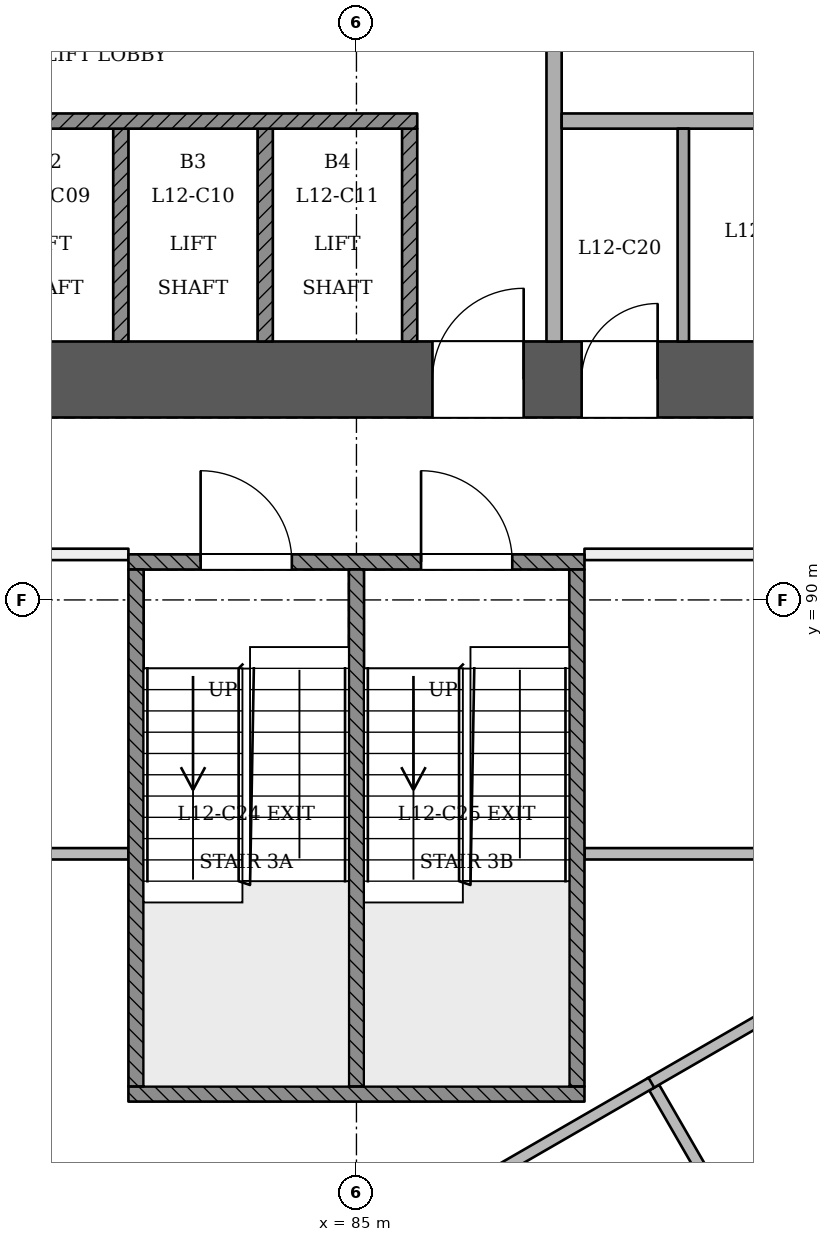
"""IFC4 building model, lengths in metres.
Left out: names, types, materials, properties, quantities, classifications, styles, units other than length and angle.
Written with IfcOpenShell. Run it as: python <this file> out.ifc"""

import sys

from ifc_helpers import new_model, si_unit, direction, frame, frame_2d, origin, place, context, subcontext, project, spatial, rectangle, extrude, element, fill, save


model = new_model("IFC4")
c1 = context("Model", 3, precision=1e-05, world=origin(), true_north=direction((0.0, 1.0)))
c2 = subcontext(c1, "Body", "Model", "MODEL_VIEW")
j1 = project(units=[si_unit("LENGTHUNIT", "METRE"), si_unit("PLANEANGLEUNIT", "RADIAN")], contexts=[c1])
p1 = place(None, origin())
s1 = spatial("IfcSite", under=j1, at=p1, CompositionType="ELEMENT")
p2 = place(p1, origin())
s2 = spatial("IfcBuilding", under=s1, at=p2, CompositionType="ELEMENT")
p3 = place(p2, frame((0.0, 0.0, 52.2)))
s3 = spatial("IfcBuildingStorey", under=s2, at=p3, CompositionType="ELEMENT", Elevation=52.2)
p4 = place(p3, frame((72.5, 92.9, 0.0), z_axis=(0.0, 0.0, 1.0), x_axis=(1.0, 0.0, 0.0)))
e1 = element("IfcWall", 1, at=p4, inside=s3, PredefinedType="SHEAR", context=c2, shape_type="SweptSolid", body=[
    extrude(rectangle(XDim=25.5, YDim=1.0, at=frame_2d((12.75, 0.0))), origin(), (0.0, 0.0, 1.0), 3.6),
])
p5 = place(p4, frame((1.3, 0.0, 0.0)))
e2 = element("IfcOpeningElement", 2, at=p5, cuts=e1, PredefinedType="OPENING", context=c2, shape_type="SweptSolid", body=[
    extrude(rectangle(XDim=1.2, YDim=2.1, at=frame_2d((0.6, 1.05))), frame((0.0, 0.51, 0.0), z_axis=(0.0, -1.0, 0.0), x_axis=(1.0, 0.0, 0.0)), (0.0, 0.0, 1.0), 1.021),
])
p6 = place(p4, frame((3.5, 0.0, 0.0)))
e3 = element("IfcOpeningElement", 3, at=p6, cuts=e1, PredefinedType="OPENING", context=c2, shape_type="SweptSolid", body=[
    extrude(rectangle(XDim=1.2, YDim=2.1, at=frame_2d((0.6, 1.05))), frame((0.0, 0.51, 0.0), z_axis=(0.0, -1.0, 0.0), x_axis=(1.0, 0.0, 0.0)), (0.0, 0.0, 1.0), 1.021),
])
p7 = place(p4, frame((13.5, 0.0, 0.0)))
e4 = element("IfcOpeningElement", 4, at=p7, cuts=e1, PredefinedType="OPENING", context=c2, shape_type="SweptSolid", body=[
    extrude(rectangle(XDim=1.2, YDim=2.1, at=frame_2d((0.6, 1.05))), frame((0.0, 0.51, 0.0), z_axis=(0.0, -1.0, 0.0), x_axis=(1.0, 0.0, 0.0)), (0.0, 0.0, 1.0), 1.021),
])
p8 = place(p4, frame((15.462, 0.0, 0.0)))
e5 = element("IfcOpeningElement", 5, at=p8, cuts=e1, PredefinedType="OPENING", context=c2, shape_type="SweptSolid", body=[
    extrude(rectangle(XDim=1.0, YDim=2.1, at=frame_2d((0.5, 1.05))), frame((0.0, 0.51, 0.0), z_axis=(0.0, -1.0, 0.0), x_axis=(1.0, 0.0, 0.0)), (0.0, 0.0, 1.0), 1.021),
])
p9 = place(p4, frame((18.3, 0.0, 0.0)))
e6 = element("IfcOpeningElement", 6, at=p9, cuts=e1, PredefinedType="OPENING", context=c2, shape_type="SweptSolid", body=[
    extrude(rectangle(XDim=1.0, YDim=2.1, at=frame_2d((0.5, 1.05))), frame((0.0, 0.51, 0.0), z_axis=(0.0, -1.0, 0.0), x_axis=(1.0, 0.0, 0.0)), (0.0, 0.0, 1.0), 1.021),
])
p10 = place(p4, frame((21.2, 0.0, 0.0)))
e7 = element("IfcOpeningElement", 7, at=p10, cuts=e1, PredefinedType="OPENING", context=c2, shape_type="SweptSolid", body=[
    extrude(rectangle(XDim=1.0, YDim=2.1, at=frame_2d((0.5, 1.05))), frame((0.0, 0.51, 0.0), z_axis=(0.0, -1.0, 0.0), x_axis=(1.0, 0.0, 0.0)), (0.0, 0.0, 1.0), 1.021),
])
p11 = place(p4, frame((23.087, 0.0, 0.0)))
e8 = element("IfcOpeningElement", 8, at=p11, cuts=e1, PredefinedType="OPENING", context=c2, shape_type="SweptSolid", body=[
    extrude(rectangle(XDim=1.0, YDim=2.1, at=frame_2d((0.5, 1.05))), frame((0.0, 0.51, 0.0), z_axis=(0.0, -1.0, 0.0), x_axis=(1.0, 0.0, 0.0)), (0.0, 0.0, 1.0), 1.021),
])
p12 = place(p3, frame((64.002, 93.308, 0.0), z_axis=(0.0, 0.0, 1.0), x_axis=(0.49999948646, -0.866025700277, 0.0)))
e9 = element("IfcWall", 9, at=p12, inside=s3, PredefinedType="PARTITIONING", context=c2, shape_type="SweptSolid", body=[
    extrude(rectangle(XDim=38.6, YDim=0.15, at=frame_2d((19.3, 0.0))), origin(), (0.0, 0.0, 1.0), 2.7),
])
p13 = place(p12, frame((0.605, 0.0, 0.0)))
e10 = element("IfcOpeningElement", 10, at=p13, cuts=e9, PredefinedType="OPENING", context=c2, shape_type="SweptSolid", body=[
    extrude(rectangle(XDim=1.0, YDim=2.1, at=frame_2d((0.5, 1.05))), frame((0.0, 0.085, 0.0), z_axis=(0.0, -1.0, 0.0), x_axis=(1.0, 0.0, 0.0)), (0.0, 0.0, 1.0), 0.171),
])
p14 = place(p12, frame((7.28, 0.0, 0.0)))
e11 = element("IfcOpeningElement", 11, at=p14, cuts=e9, PredefinedType="OPENING", context=c2, shape_type="SweptSolid", body=[
    extrude(rectangle(XDim=1.0, YDim=2.1, at=frame_2d((0.5, 1.05))), frame((0.0, 0.085, 0.0), z_axis=(0.0, -1.0, 0.0), x_axis=(1.0, 0.0, 0.0)), (0.0, 0.0, 1.0), 0.171),
])
p15 = place(p12, frame((9.72, 0.0, 0.0)))
e12 = element("IfcOpeningElement", 12, at=p15, cuts=e9, PredefinedType="OPENING", context=c2, shape_type="SweptSolid", body=[
    extrude(rectangle(XDim=1.0, YDim=2.1, at=frame_2d((0.5, 1.05))), frame((0.0, 0.085, 0.0), z_axis=(0.0, -1.0, 0.0), x_axis=(1.0, 0.0, 0.0)), (0.0, 0.0, 1.0), 0.171),
])
p16 = place(p12, frame((16.395, 0.0, 0.0)))
e13 = element("IfcOpeningElement", 13, at=p16, cuts=e9, PredefinedType="OPENING", context=c2, shape_type="SweptSolid", body=[
    extrude(rectangle(XDim=1.0, YDim=2.1, at=frame_2d((0.5, 1.05))), frame((0.0, 0.085, 0.0), z_axis=(0.0, -1.0, 0.0), x_axis=(1.0, 0.0, 0.0)), (0.0, 0.0, 1.0), 0.171),
])
p17 = place(p12, frame((18.72, 0.0, 0.0)))
e14 = element("IfcOpeningElement", 14, at=p17, cuts=e9, PredefinedType="OPENING", context=c2, shape_type="SweptSolid", body=[
    extrude(rectangle(XDim=1.0, YDim=2.1, at=frame_2d((0.5, 1.05))), frame((0.0, 0.085, 0.0), z_axis=(0.0, -1.0, 0.0), x_axis=(1.0, 0.0, 0.0)), (0.0, 0.0, 1.0), 0.171),
])
p18 = place(p12, frame((25.395, 0.0, 0.0)))
e15 = element("IfcOpeningElement", 15, at=p18, cuts=e9, PredefinedType="OPENING", context=c2, shape_type="SweptSolid", body=[
    extrude(rectangle(XDim=1.0, YDim=2.1, at=frame_2d((0.5, 1.05))), frame((0.0, 0.085, 0.0), z_axis=(0.0, -1.0, 0.0), x_axis=(1.0, 0.0, 0.0)), (0.0, 0.0, 1.0), 0.171),
])
p19 = place(p12, frame((27.605, 0.0, 0.0)))
e16 = element("IfcOpeningElement", 16, at=p19, cuts=e9, PredefinedType="OPENING", context=c2, shape_type="SweptSolid", body=[
    extrude(rectangle(XDim=1.0, YDim=2.1, at=frame_2d((0.5, 1.05))), frame((0.0, 0.085, 0.0), z_axis=(0.0, -1.0, 0.0), x_axis=(1.0, 0.0, 0.0)), (0.0, 0.0, 1.0), 0.171),
])
p20 = place(p12, frame((34.28, 0.0, 0.0)))
e17 = element("IfcOpeningElement", 17, at=p20, cuts=e9, PredefinedType="OPENING", context=c2, shape_type="SweptSolid", body=[
    extrude(rectangle(XDim=1.0, YDim=2.1, at=frame_2d((0.5, 1.05))), frame((0.0, 0.085, 0.0), z_axis=(0.0, -1.0, 0.0), x_axis=(1.0, 0.0, 0.0)), (0.0, 0.0, 1.0), 0.171),
])
p21 = place(p12, frame((37.324, 0.0, 0.0)))
e18 = element("IfcOpeningElement", 18, at=p21, cuts=e9, PredefinedType="OPENING", context=c2, shape_type="SweptSolid", body=[
    extrude(rectangle(XDim=1.0, YDim=2.1, at=frame_2d((0.5, 1.05))), frame((0.0, 0.085, 0.0), z_axis=(0.0, -1.0, 0.0), x_axis=(1.0, 0.0, 0.0)), (0.0, 0.0, 1.0), 0.171),
])
p22 = place(p3, frame((86.05, 58.757, 0.0), z_axis=(0.0, 0.0, 1.0), x_axis=(0.499999296855, 0.866025809745, 0.0)))
e19 = element("IfcWall", 19, at=p22, inside=s3, PredefinedType="PARTITIONING", context=c2, shape_type="SweptSolid", body=[
    extrude(rectangle(XDim=43.792, YDim=0.15, at=frame_2d((21.896, 0.0))), origin(), (0.0, 0.0, 1.0), 2.7),
])
p23 = place(p22, frame((3.598, 0.0, 0.0)))
e20 = element("IfcOpeningElement", 20, at=p23, cuts=e19, PredefinedType="OPENING", context=c2, shape_type="SweptSolid", body=[
    extrude(rectangle(XDim=1.2, YDim=2.1, at=frame_2d((0.6, 1.05))), frame((0.0, 0.085, 0.0), z_axis=(0.0, -1.0, 0.0), x_axis=(1.0, 0.0, 0.0)), (0.0, 0.0, 1.0), 0.171),
])
p24 = place(p22, frame((11.176, 0.0, 0.0)))
e21 = element("IfcOpeningElement", 21, at=p24, cuts=e19, PredefinedType="OPENING", context=c2, shape_type="SweptSolid", body=[
    extrude(rectangle(XDim=1.0, YDim=2.1, at=frame_2d((0.5, 1.05))), frame((0.0, 0.085, 0.0), z_axis=(0.0, -1.0, 0.0), x_axis=(1.0, 0.0, 0.0)), (0.0, 0.0, 1.0), 0.171),
])
p25 = place(p22, frame((13.616, 0.0, 0.0)))
e22 = element("IfcOpeningElement", 22, at=p25, cuts=e19, PredefinedType="OPENING", context=c2, shape_type="SweptSolid", body=[
    extrude(rectangle(XDim=1.0, YDim=2.1, at=frame_2d((0.5, 1.05))), frame((0.0, 0.085, 0.0), z_axis=(0.0, -1.0, 0.0), x_axis=(1.0, 0.0, 0.0)), (0.0, 0.0, 1.0), 0.171),
])
p26 = place(p22, frame((20.176, 0.0, 0.0)))
e23 = element("IfcOpeningElement", 23, at=p26, cuts=e19, PredefinedType="OPENING", context=c2, shape_type="SweptSolid", body=[
    extrude(rectangle(XDim=1.0, YDim=2.1, at=frame_2d((0.5, 1.05))), frame((0.0, 0.085, 0.0), z_axis=(0.0, -1.0, 0.0), x_axis=(1.0, 0.0, 0.0)), (0.0, 0.0, 1.0), 0.171),
])
p27 = place(p22, frame((22.616, 0.0, 0.0)))
e24 = element("IfcOpeningElement", 24, at=p27, cuts=e19, PredefinedType="OPENING", context=c2, shape_type="SweptSolid", body=[
    extrude(rectangle(XDim=1.0, YDim=2.1, at=frame_2d((0.5, 1.05))), frame((0.0, 0.085, 0.0), z_axis=(0.0, -1.0, 0.0), x_axis=(1.0, 0.0, 0.0)), (0.0, 0.0, 1.0), 0.171),
])
p28 = place(p22, frame((29.176, 0.0, 0.0)))
e25 = element("IfcOpeningElement", 25, at=p28, cuts=e19, PredefinedType="OPENING", context=c2, shape_type="SweptSolid", body=[
    extrude(rectangle(XDim=1.0, YDim=2.1, at=frame_2d((0.5, 1.05))), frame((0.0, 0.085, 0.0), z_axis=(0.0, -1.0, 0.0), x_axis=(1.0, 0.0, 0.0)), (0.0, 0.0, 1.0), 0.171),
])
p29 = place(p22, frame((31.616, 0.0, 0.0)))
e26 = element("IfcOpeningElement", 26, at=p29, cuts=e19, PredefinedType="OPENING", context=c2, shape_type="SweptSolid", body=[
    extrude(rectangle(XDim=1.0, YDim=2.1, at=frame_2d((0.5, 1.05))), frame((0.0, 0.085, 0.0), z_axis=(0.0, -1.0, 0.0), x_axis=(1.0, 0.0, 0.0)), (0.0, 0.0, 1.0), 0.171),
])
p30 = place(p22, frame((38.176, 0.0, 0.0)))
e27 = element("IfcOpeningElement", 27, at=p30, cuts=e19, PredefinedType="OPENING", context=c2, shape_type="SweptSolid", body=[
    extrude(rectangle(XDim=1.0, YDim=2.1, at=frame_2d((0.5, 1.05))), frame((0.0, 0.085, 0.0), z_axis=(0.0, -1.0, 0.0), x_axis=(1.0, 0.0, 0.0)), (0.0, 0.0, 1.0), 0.171),
])
p31 = place(p22, frame((41.344, 0.0, 0.0)))
e28 = element("IfcOpeningElement", 28, at=p31, cuts=e19, PredefinedType="OPENING", context=c2, shape_type="SweptSolid", body=[
    extrude(rectangle(XDim=1.0, YDim=2.1, at=frame_2d((0.5, 1.05))), frame((0.0, 0.085, 0.0), z_axis=(0.0, -1.0, 0.0), x_axis=(1.0, 0.0, 0.0)), (0.0, 0.0, 1.0), 0.171),
])
p32 = place(p3, frame((85.0, 60.54, 0.0), z_axis=(0.0, 0.0, 1.0), x_axis=(-0.500000084694, 0.866025354886, 0.0)))
e29 = element("IfcWall", 29, at=p32, inside=s3, PredefinedType="PARTITIONING", context=c2, shape_type="SweptSolid", body=[
    extrude(rectangle(XDim=34.711, YDim=0.15, at=frame_2d((17.355, 0.0))), origin(), (0.0, 0.0, 1.0), 3.1),
])
p33 = place(p32, frame((5.966, 0.0, 0.0)))
e30 = element("IfcOpeningElement", 30, at=p33, cuts=e29, PredefinedType="OPENING", context=c2, shape_type="SweptSolid", body=[
    extrude(rectangle(XDim=1.2, YDim=2.1, at=frame_2d((0.6, 1.05))), frame((0.0, 0.085, 0.0), z_axis=(0.0, -1.0, 0.0), x_axis=(1.0, 0.0, 0.0)), (0.0, 0.0, 1.0), 0.171),
])
p34 = place(p32, frame((11.813, 0.0, 0.0)))
e31 = element("IfcOpeningElement", 31, at=p34, cuts=e29, PredefinedType="OPENING", context=c2, shape_type="SweptSolid", body=[
    extrude(rectangle(XDim=1.2, YDim=2.1, at=frame_2d((0.6, 1.05))), frame((0.0, 0.085, 0.0), z_axis=(0.0, -1.0, 0.0), x_axis=(1.0, 0.0, 0.0)), (0.0, 0.0, 1.0), 0.171),
])
p35 = place(p32, frame((25.156, 0.0, 0.0)))
e32 = element("IfcOpeningElement", 32, at=p35, cuts=e29, PredefinedType="OPENING", context=c2, shape_type="SweptSolid", body=[
    extrude(rectangle(XDim=1.2, YDim=2.1, at=frame_2d((0.6, 1.05))), frame((0.0, 0.085, 0.0), z_axis=(0.0, -1.0, 0.0), x_axis=(1.0, 0.0, 0.0)), (0.0, 0.0, 1.0), 0.171),
])
p36 = place(p32, frame((30.288, 0.0, 0.0)))
e33 = element("IfcOpeningElement", 33, at=p36, cuts=e29, PredefinedType="OPENING", context=c2, shape_type="SweptSolid", body=[
    extrude(rectangle(XDim=1.2, YDim=2.1, at=frame_2d((0.6, 1.05))), frame((0.0, 0.085, 0.0), z_axis=(0.0, -1.0, 0.0), x_axis=(1.0, 0.0, 0.0)), (0.0, 0.0, 1.0), 0.171),
])
p37 = place(p32, frame((15.887, 0.0, 0.0)))
e34 = element("IfcOpeningElement", 34, at=p37, cuts=e29, PredefinedType="OPENING", context=c2, shape_type="SweptSolid", body=[
    extrude(rectangle(XDim=1.2, YDim=2.1, at=frame_2d((0.6, 1.05))), frame((0.0, 0.085, 0.0), z_axis=(0.0, -1.0, 0.0), x_axis=(1.0, 0.0, 0.0)), (0.0, 0.0, 1.0), 0.171),
])
p38 = place(p32, frame((19.777, 0.0, 0.0)))
e35 = element("IfcOpeningElement", 35, at=p38, cuts=e29, PredefinedType="OPENING", context=c2, shape_type="SweptSolid", body=[
    extrude(rectangle(XDim=1.2, YDim=2.1, at=frame_2d((0.6, 1.05))), frame((0.0, 0.085, 0.0), z_axis=(0.0, -1.0, 0.0), x_axis=(1.0, 0.0, 0.0)), (0.0, 0.0, 1.0), 0.171),
])
p39 = place(p3, frame((102.355, 90.6, 0.0), z_axis=(0.0, 0.0, 1.0), x_axis=(-0.500000924128, -0.866024870238, 0.0)))
e36 = element("IfcWall", 36, at=p39, inside=s3, PredefinedType="PARTITIONING", context=c2, shape_type="SweptSolid", body=[
    extrude(rectangle(XDim=34.581, YDim=0.15, at=frame_2d((17.291, 0.0))), origin(), (0.0, 0.0, 1.0), 3.1),
])
p40 = place(p39, frame((9.118, 0.0, 0.0)))
e37 = element("IfcOpeningElement", 37, at=p40, cuts=e36, PredefinedType="OPENING", context=c2, shape_type="SweptSolid", body=[
    extrude(rectangle(XDim=1.2, YDim=2.1, at=frame_2d((0.6, 1.05))), frame((0.0, 0.085, 0.0), z_axis=(0.0, -1.0, 0.0), x_axis=(1.0, 0.0, 0.0)), (0.0, 0.0, 1.0), 0.171),
])
p41 = place(p3, frame((67.775, 90.6, 0.0), z_axis=(0.0, 0.0, 1.0), x_axis=(0.999999997644, -6.8649493e-05, 0.0)))
e38 = element("IfcWall", 38, at=p41, inside=s3, PredefinedType="PARTITIONING", context=c2, shape_type="SweptSolid", body=[
    extrude(rectangle(XDim=14.225, YDim=0.15, at=frame_2d((7.113, 0.0))), origin(), (0.0, 0.0, 1.0), 3.1),
])
p42 = place(p3, frame((88.0, 90.599, 0.0), z_axis=(0.0, 0.0, 1.0), x_axis=(0.999999997644, 6.8649493e-05, 0.0)))
e39 = element("IfcWall", 39, at=p42, inside=s3, PredefinedType="PARTITIONING", context=c2, shape_type="SweptSolid", body=[
    extrude(rectangle(XDim=14.225, YDim=0.15, at=frame_2d((7.113, 0.0))), origin(), (0.0, 0.0, 1.0), 3.1),
])
p43 = place(p42, frame((4.457, 0.0, 0.0)))
e40 = element("IfcOpeningElement", 40, at=p43, cuts=e39, PredefinedType="OPENING", context=c2, shape_type="SweptSolid", body=[
    extrude(rectangle(XDim=1.0, YDim=2.1, at=frame_2d((0.5, 1.05))), frame((0.0, 0.085, 0.0), z_axis=(0.0, -1.0, 0.0), x_axis=(1.0, 0.0, 0.0)), (0.0, 0.0, 1.0), 0.171),
])
p44 = place(p3, frame((88.917, 83.584, 0.0), z_axis=(0.0, 0.0, 1.0), x_axis=(0.499986679841, -0.866033094045, 0.0)))
e41 = element("IfcWall", 41, at=p44, inside=s3, PredefinedType="PARTITIONING", context=c2, shape_type="SweptSolid", body=[
    extrude(rectangle(XDim=7.998, YDim=0.15, at=frame_2d((3.999, 0.0))), origin(), (0.0, 0.0, 1.0), 3.1),
])
p45 = place(p3, frame((100.676, 90.46, 0.0), z_axis=(0.0, 0.0, 1.0), x_axis=(-0.866019571687, -0.500010101354, 0.0)))
e42 = element("IfcWall", 42, at=p45, inside=s3, PredefinedType="PARTITIONING", context=c2, shape_type="SweptSolid", body=[
    extrude(rectangle(XDim=13.641, YDim=0.15, at=frame_2d((6.82, 0.0))), origin(), (0.0, 0.0, 1.0), 3.1),
])
p46 = place(p3, frame((82.0, 86.66, 0.0), z_axis=(0.0, 0.0, 1.0), x_axis=(-1.0, 0.0, 0.0)))
e43 = element("IfcWall", 43, at=p46, inside=s3, PredefinedType="PARTITIONING", context=c2, shape_type="SweptSolid", body=[
    extrude(rectangle(XDim=11.951, YDim=0.15, at=frame_2d((5.976, 0.0))), origin(), (0.0, 0.0, 1.0), 3.1),
])
p47 = place(p3, frame((86.358, 82.194, 0.0), z_axis=(0.0, 0.0, 1.0), x_axis=(0.86603616059, 0.499981368203, 0.0)))
e44 = element("IfcWall", 44, at=p47, inside=s3, PredefinedType="PARTITIONING", context=c2, shape_type="SweptSolid", body=[
    extrude(rectangle(XDim=2.911, YDim=0.15, at=frame_2d((1.456, 0.0))), origin(), (0.0, 0.0, 1.0), 3.1),
])
p48 = place(p3, frame((93.814, 86.66, 0.0), z_axis=(0.0, 0.0, 1.0), x_axis=(-1.0, 0.0, 0.0)))
e45 = element("IfcWall", 45, at=p48, inside=s3, PredefinedType="PARTITIONING", context=c2, shape_type="SweptSolid", body=[
    extrude(rectangle(XDim=5.814, YDim=0.15, at=frame_2d((2.907, 0.0))), origin(), (0.0, 0.0, 1.0), 3.1),
])
for number, where, z_axis, x_axis in (
    (46, (81.9, 93.4, 0.0), (0.0, 0.0, 1.0), (0.0, 1.0, 0.0)),
    (47, (83.8, 93.4, 0.0), (0.0, 0.0, 1.0), (0.0, 1.0, 0.0)),
    (48, (85.7, 93.4, 0.0), (0.0, 0.0, 1.0), (0.0, 1.0, 0.0)),
):
    element("IfcWall", number, at=place(p3, frame(where, z_axis=z_axis, x_axis=x_axis)), inside=s3, PredefinedType="SOLIDWALL", context=c2, shape_type="SweptSolid", body=[
        extrude(rectangle(XDim=2.8, YDim=0.2, at=frame_2d((1.4, 0.0))), origin(), (0.0, 0.0, 1.0), 3.1),
    ])
p49 = place(p3, frame((87.6, 93.4, 0.0), z_axis=(0.0, 0.0, 1.0), x_axis=(0.0, 1.0, 0.0)))
e49 = element("IfcWall", 49, at=p49, inside=s3, PredefinedType="PARTITIONING", context=c2, shape_type="SweptSolid", body=[
    extrude(rectangle(XDim=7.0, YDim=0.2, at=frame_2d((3.5, 0.0))), origin(), (0.0, 0.0, 1.0), 3.1),
])
p50 = place(p49, frame((4.45, 0.0, 0.0)))
e50 = element("IfcOpeningElement", 50, at=p50, cuts=e49, PredefinedType="OPENING", context=c2, shape_type="SweptSolid", body=[
    extrude(rectangle(XDim=1.1, YDim=2.1, at=frame_2d((0.55, 1.05))), frame((0.0, 0.11, 0.0), z_axis=(0.0, -1.0, 0.0), x_axis=(1.0, 0.0, 0.0)), (0.0, 0.0, 1.0), 0.221),
])
p51 = place(p3, frame((89.3, 93.4, 0.0), z_axis=(0.0, 0.0, 1.0), x_axis=(0.0, 1.0, 0.0)))
e51 = element("IfcWall", 51, at=p51, inside=s3, PredefinedType="PARTITIONING", context=c2, shape_type="SweptSolid", body=[
    extrude(rectangle(XDim=2.8, YDim=0.15, at=frame_2d((1.4, 0.0))), origin(), (0.0, 0.0, 1.0), 3.1),
])
p52 = place(p3, frame((78.0, 96.3, 0.0), z_axis=(0.0, 0.0, 1.0), x_axis=(1.0, 0.0, 0.0)))
e52 = element("IfcWall", 52, at=p52, inside=s3, PredefinedType="SOLIDWALL", context=c2, shape_type="SweptSolid", body=[
    extrude(rectangle(XDim=7.8, YDim=0.2, at=frame_2d((3.9, 0.0))), origin(), (0.0, 0.0, 1.0), 3.1),
])
p53 = place(p3, frame((87.7, 96.3, 0.0), z_axis=(0.0, 0.0, 1.0), x_axis=(1.0, 0.0, 0.0)))
e53 = element("IfcWall", 53, at=p53, inside=s3, PredefinedType="PARTITIONING", context=c2, shape_type="SweptSolid", body=[
    extrude(rectangle(XDim=3.6, YDim=0.2, at=frame_2d((1.8, 0.0))), origin(), (0.0, 0.0, 1.0), 3.1),
])
p54 = place(p3, frame((82.0, 90.5, 0.0), z_axis=(0.0, 0.0, 1.0), x_axis=(1.0, 0.0, 0.0)))
e54 = element("IfcWall", 54, at=p54, inside=s3, PredefinedType="SOLIDWALL", context=c2, shape_type="SweptSolid", body=[
    extrude(rectangle(XDim=6.0, YDim=0.2, at=frame_2d((3.0, 0.0))), origin(), (0.0, 0.0, 1.0), 3.1),
])
p55 = place(p54, frame((0.95, 0.0, 0.0)))
e55 = element("IfcOpeningElement", 55, at=p55, cuts=e54, PredefinedType="OPENING", context=c2, shape_type="SweptSolid", body=[
    extrude(rectangle(XDim=1.2, YDim=2.1, at=frame_2d((0.6, 1.05))), frame((0.0, 0.11, 0.0), z_axis=(0.0, -1.0, 0.0), x_axis=(1.0, 0.0, 0.0)), (0.0, 0.0, 1.0), 0.221),
])
p56 = place(p54, frame((3.85, 0.0, 0.0)))
e56 = element("IfcOpeningElement", 56, at=p56, cuts=e54, PredefinedType="OPENING", context=c2, shape_type="SweptSolid", body=[
    extrude(rectangle(XDim=1.2, YDim=2.1, at=frame_2d((0.6, 1.05))), frame((0.0, 0.11, 0.0), z_axis=(0.0, -1.0, 0.0), x_axis=(1.0, 0.0, 0.0)), (0.0, 0.0, 1.0), 0.221),
])
p57 = place(p3, frame((82.0, 83.5, 0.0), z_axis=(0.0, 0.0, 1.0), x_axis=(1.0, 0.0, 0.0)))
e57 = element("IfcWall", 57, at=p57, inside=s3, PredefinedType="SOLIDWALL", context=c2, shape_type="SweptSolid", body=[
    extrude(rectangle(XDim=6.0, YDim=0.2, at=frame_2d((3.0, 0.0))), origin(), (0.0, 0.0, 1.0), 3.1),
])
for number, where, z_axis, x_axis in (
    (58, (82.1, 83.6, 0.0), (0.0, 0.0, 1.0), (0.0, 1.0, 0.0)),
    (59, (87.9, 83.6, 0.0), (0.0, 0.0, 1.0), (0.0, 1.0, 0.0)),
    (60, (85.0, 83.6, 0.0), (0.0, 0.0, 1.0), (0.0, 1.0, 0.0)),
):
    element("IfcWall", number, at=place(p3, frame(where, z_axis=z_axis, x_axis=x_axis)), inside=s3, PredefinedType="SOLIDWALL", context=c2, shape_type="SweptSolid", body=[
        extrude(rectangle(XDim=6.8, YDim=0.2, at=frame_2d((3.4, 0.0))), origin(), (0.0, 0.0, 1.0), 3.1),
    ])
p58 = place(p7, origin())
e61 = element("IfcDoor", 61, at=p58, inside=s3, OperationType="SINGLE_SWING_RIGHT", PredefinedType="NOTDEFINED", context=c2, shape_type="SweptSolid", body=[
    extrude(rectangle(XDim=1.2, YDim=2.1, at=frame_2d((0.6, 1.05))), frame((0.0, 0.025, 0.0), z_axis=(0.0, -1.0, 0.0), x_axis=(1.0, 0.0, 0.0)), (0.0, 0.0, 1.0), 0.05),
])
fill(e4, e61)
p59 = place(p8, origin())
e62 = element("IfcDoor", 62, at=p59, inside=s3, OperationType="SINGLE_SWING_RIGHT", PredefinedType="NOTDEFINED", context=c2, shape_type="SweptSolid", body=[
    extrude(rectangle(XDim=1.0, YDim=2.1, at=frame_2d((0.5, 1.05))), frame((0.0, 0.025, 0.0), z_axis=(0.0, -1.0, 0.0), x_axis=(1.0, 0.0, 0.0)), (0.0, 0.0, 1.0), 0.05),
])
fill(e5, e62)
p60 = place(p55, origin())
e63 = element("IfcDoor", 63, at=p60, inside=s3, OperationType="SINGLE_SWING_LEFT", PredefinedType="NOTDEFINED", context=c2, shape_type="SweptSolid", body=[
    extrude(rectangle(XDim=1.2, YDim=2.1, at=frame_2d((0.6, 1.05))), frame((0.0, 0.025, 0.0), z_axis=(0.0, -1.0, 0.0), x_axis=(1.0, 0.0, 0.0)), (0.0, 0.0, 1.0), 0.05),
])
fill(e55, e63)
p61 = place(p56, origin())
e64 = element("IfcDoor", 64, at=p61, inside=s3, OperationType="SINGLE_SWING_LEFT", PredefinedType="NOTDEFINED", context=c2, shape_type="SweptSolid", body=[
    extrude(rectangle(XDim=1.2, YDim=2.1, at=frame_2d((0.6, 1.05))), frame((0.0, 0.025, 0.0), z_axis=(0.0, -1.0, 0.0), x_axis=(1.0, 0.0, 0.0)), (0.0, 0.0, 1.0), 0.05),
])
fill(e56, e64)
save(model, sys.argv[1])
